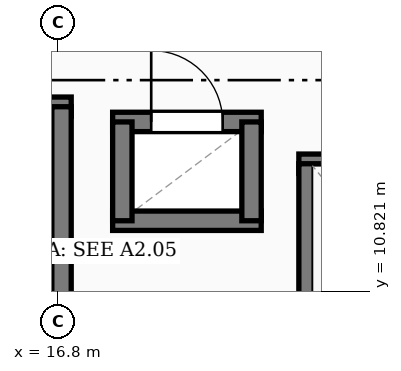
"""IFC4 building model, lengths in metres.
Left out: names, types, materials, properties, quantities, classifications, styles, units other than length and angle.
Written with IfcOpenShell. Run it as: python <this file> out.ifc"""

import sys

from ifc_helpers import new_model, si_unit, direction, frame, frame_2d, origin, place, context, subcontext, project, spatial, rectangle, extrude, element, fill, save


model = new_model("IFC4")
c1 = context("Model", 3, precision=1e-05, world=origin(), true_north=direction((0.0, 1.0)))
c2 = subcontext(c1, "Body", "Model", "MODEL_VIEW")
j1 = project(units=[si_unit("LENGTHUNIT", "METRE"), si_unit("PLANEANGLEUNIT", "RADIAN")], contexts=[c1])
p1 = place(None, origin())
s1 = spatial("IfcSite", under=j1, at=p1, CompositionType="ELEMENT")
p2 = place(p1, origin())
s2 = spatial("IfcBuilding", under=s1, at=p2, CompositionType="ELEMENT")
p3 = place(p2, frame((0.0, 0.0, 18.48)))
s3 = spatial("IfcBuildingStorey", under=s2, at=p3, CompositionType="ELEMENT", Elevation=18.48)
p4 = place(p3, frame((8.752, 13.25, 0.0), z_axis=(0.0, 0.0, 1.0), x_axis=(1.0, 0.0, 0.0)))
e1 = element("IfcWall", 1, at=p4, inside=s3, PredefinedType="SOLIDWALL", context=c2, shape_type="SweptSolid", body=[
    extrude(rectangle(XDim=8.225, YDim=0.255, at=frame_2d((4.113, 0.0))), origin(), (0.0, 0.0, 1.0), 3.125),
])
p5 = place(p4, frame((0.35, 0.0, 0.0)))
e2 = element("IfcOpeningElement", 2, at=p5, cuts=e1, PredefinedType="OPENING", context=c2, shape_type="SweptSolid", body=[
    extrude(rectangle(XDim=1.25, YDim=2.2, at=frame_2d((0.625, 1.1))), frame((0.0, 0.137, 0.0), z_axis=(0.0, -1.0, 0.0), x_axis=(1.0, 0.0, 0.0)), (0.0, 0.0, 1.0), 0.275),
])
p6 = place(p3, frame((16.85, 9.38, 0.0), z_axis=(0.0, 0.0, 1.0), x_axis=(0.0, 1.0, 0.0)))
e3 = element("IfcWall", 3, at=p6, inside=s3, PredefinedType="SOLIDWALL", context=c2, shape_type="SweptSolid", body=[
    extrude(rectangle(XDim=3.87, YDim=0.255, at=frame_2d((1.935, 0.0))), origin(), (0.0, 0.0, 1.0), 3.125),
])
p7 = place(p3, frame((19.972, 12.5, 0.0), z_axis=(0.0, 0.0, 1.0), x_axis=(1.0, 0.0, 0.0)))
e4 = element("IfcWall", 4, at=p7, inside=s3, PredefinedType="SOLIDWALL", context=c2, shape_type="SweptSolid", body=[
    extrude(rectangle(XDim=2.455, YDim=0.255, at=frame_2d((1.228, 0.0))), origin(), (0.0, 0.0, 1.0), 3.125),
])
p8 = place(p7, frame((0.677, 0.0, 0.0)))
e5 = element("IfcOpeningElement", 5, at=p8, cuts=e4, PredefinedType="OPENING", context=c2, shape_type="SweptSolid", body=[
    extrude(rectangle(XDim=1.1, YDim=2.15, at=frame_2d((0.55, 1.075))), frame((0.0, 0.137, 0.0), z_axis=(0.0, -1.0, 0.0), x_axis=(1.0, 0.0, 0.0)), (0.0, 0.0, 1.0), 0.275),
])
p9 = place(p3, frame((20.1, 9.9, 0.0), z_axis=(0.0, 0.0, 1.0), x_axis=(0.0, 1.0, 0.0)))
e6 = element("IfcWall", 6, at=p9, inside=s3, PredefinedType="SOLIDWALL", context=c2, shape_type="SweptSolid", body=[
    extrude(rectangle(XDim=2.6, YDim=0.255, at=frame_2d((1.3, 0.0))), origin(), (0.0, 0.0, 1.0), 3.125),
])
p10 = place(p3, frame((17.522, 11.75, 0.0), z_axis=(0.0, 0.0, 1.0), x_axis=(1.0, 0.0, 0.0)))
e7 = element("IfcWall", 7, at=p10, inside=s3, PredefinedType="SOLIDWALL", context=c2, shape_type="SweptSolid", body=[
    extrude(rectangle(XDim=1.955, YDim=0.255, at=frame_2d((0.978, 0.0))), origin(), (0.0, 0.0, 1.0), 3.125),
])
p11 = place(p3, frame((17.522, 13.05, 0.0), z_axis=(0.0, 0.0, 1.0), x_axis=(1.0, 0.0, 0.0)))
e8 = element("IfcWall", 8, at=p11, inside=s3, PredefinedType="SOLIDWALL", context=c2, shape_type="SweptSolid", body=[
    extrude(rectangle(XDim=1.955, YDim=0.255, at=frame_2d((0.978, 0.0))), origin(), (0.0, 0.0, 1.0), 3.125),
])
p12 = place(p11, frame((0.508, 0.0, 0.0)))
e9 = element("IfcOpeningElement", 9, at=p12, cuts=e8, PredefinedType="OPENING", context=c2, shape_type="SweptSolid", body=[
    extrude(rectangle(XDim=0.94, YDim=2.1, at=frame_2d((0.47, 1.05))), frame((0.0, 0.137, 0.0), z_axis=(0.0, -1.0, 0.0), x_axis=(1.0, 0.0, 0.0)), (0.0, 0.0, 1.0), 0.275),
])
for number, where, z_axis, x_axis in (
    (10, (17.65, 11.75, 0.0), (0.0, 0.0, 1.0), (0.0, 1.0, 0.0)),
    (11, (19.35, 11.75, 0.0), (0.0, 0.0, 1.0), (0.0, 1.0, 0.0)),
):
    element("IfcWall", number, at=place(p3, frame(where, z_axis=z_axis, x_axis=x_axis)), inside=s3, PredefinedType="SOLIDWALL", context=c2, shape_type="SweptSolid", body=[
        extrude(rectangle(XDim=1.3, YDim=0.255, at=frame_2d((0.65, 0.0))), origin(), (0.0, 0.0, 1.0), 3.125),
    ])
p13 = place(p12, origin())
e12 = element("IfcDoor", 12, at=p13, inside=s3, OperationType="SINGLE_SWING_LEFT", PredefinedType="DOOR", context=c2, shape_type="SweptSolid", body=[
    extrude(rectangle(XDim=0.94, YDim=2.1, at=frame_2d((0.47, 1.05))), frame((0.0, 0.025, 0.0), z_axis=(0.0, -1.0, 0.0), x_axis=(1.0, 0.0, 0.0)), (0.0, 0.0, 1.0), 0.05),
])
fill(e9, e12)
save(model, sys.argv[1])
